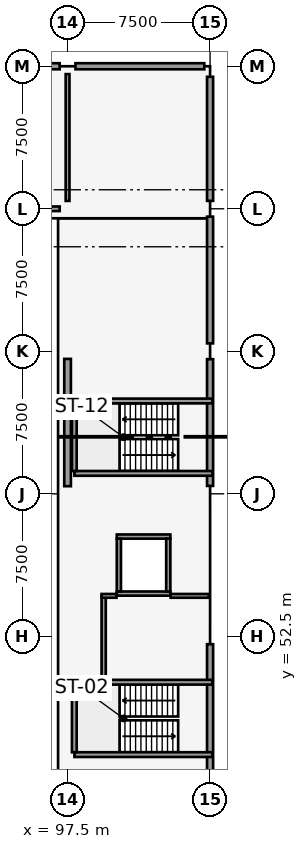
"""IFC4 building model, lengths in metres.
Left out: names, types, materials, properties, quantities, classifications, styles, units other than length and angle.
Written with IfcOpenShell. Run it as: python <this file> out.ifc"""

import sys

from ifc_helpers import new_model, si_unit, direction, frame, frame_2d, origin, origin_2d, place, context, subcontext, project, spatial, rectangle, extrude, element, fill, save


model = new_model("IFC4")
c1 = context("Model", 3, precision=1e-05, world=origin(), true_north=direction((0.0, 1.0)))
c2 = subcontext(c1, "Body", "Model", "MODEL_VIEW")
j1 = project(units=[si_unit("LENGTHUNIT", "METRE"), si_unit("PLANEANGLEUNIT", "RADIAN")], contexts=[c1])
p1 = place(None, origin())
s1 = spatial("IfcSite", under=j1, at=p1, CompositionType="ELEMENT")
p2 = place(p1, origin())
s2 = spatial("IfcBuilding", under=s1, at=p2, CompositionType="ELEMENT")
p3 = place(p2, frame((0.0, 0.0, 9.0)))
s3 = spatial("IfcBuildingStorey", under=s2, at=p3, CompositionType="ELEMENT", Elevation=9.0)
for number, where, z_axis, x_axis in (
    (1, (97.5, 52.5, 0.0), (0.0, 0.0, 1.0), (1.0, 0.0, 0.0)),
    (2, (97.5, 60.0, 0.0), (0.0, 0.0, 1.0), (1.0, 0.0, 0.0)),
    (3, (97.5, 67.5, 0.0), (0.0, 0.0, 1.0), (1.0, 0.0, 0.0)),
    (4, (97.5, 75.0, 0.0), (0.0, 0.0, 1.0), (1.0, 0.0, 0.0)),
    (5, (97.5, 82.5, 0.0), (0.0, 0.0, 1.0), (1.0, 0.0, 0.0)),
    (6, (105.0, 52.5, 0.0), (0.0, 0.0, 1.0), (1.0, 0.0, 0.0)),
    (7, (105.0, 60.0, 0.0), (0.0, 0.0, 1.0), (1.0, 0.0, 0.0)),
    (8, (105.0, 67.5, 0.0), (0.0, 0.0, 1.0), (1.0, 0.0, 0.0)),
    (9, (105.0, 75.0, 0.0), (0.0, 0.0, 1.0), (1.0, 0.0, 0.0)),
):
    element("IfcColumn", number, at=place(p3, frame(where, z_axis=z_axis, x_axis=x_axis)), inside=s3, PredefinedType="COLUMN", context=c2, shape_type="SweptSolid", body=[
        extrude(rectangle(XDim=0.8, YDim=0.8, at=origin_2d()), origin(), (0.0, 0.0, 1.0), 4.2),
    ])
p4 = place(p3, frame((105.0, 82.5, 0.0), z_axis=(0.0, 0.0, 1.0), x_axis=(1.0, 0.0, 0.0)))
e10 = element("IfcColumn", 10, at=p4, inside=s3, PredefinedType="COLUMN", context=c2, shape_type="SweptSolid", body=[
    extrude(rectangle(XDim=0.6, YDim=1.1, at=origin_2d()), origin(), (0.0, 0.0, 1.0), 4.2),
])
p5 = place(p3, frame((97.5, 60.4, 0.0), z_axis=(0.0, 0.0, 1.0), x_axis=(0.0, 1.0, 0.0)))
e11 = element("IfcWall", 11, at=p5, inside=s3, PredefinedType="SHEAR", context=c2, shape_type="SweptSolid", body=[
    extrude(rectangle(XDim=6.7, YDim=0.35, at=frame_2d((3.35, 0.0))), origin(), (0.0, 0.0, 1.0), 3.0),
])
p6 = place(p3, frame((105.0, 45.415, 0.0), z_axis=(0.0, 0.0, 1.0), x_axis=(0.0, 1.0, 0.0)))
e12 = element("IfcWall", 12, at=p6, inside=s3, PredefinedType="SOLIDWALL", context=c2, shape_type="SweptSolid", body=[
    extrude(rectangle(XDim=6.67, YDim=0.32, at=frame_2d((3.335, 0.0))), origin(), (0.0, 0.0, 1.0), 2.92),
])
p7 = place(p3, frame((105.0, 60.415, 0.0), z_axis=(0.0, 0.0, 1.0), x_axis=(0.0, 1.0, 0.0)))
e13 = element("IfcWall", 13, at=p7, inside=s3, PredefinedType="SOLIDWALL", context=c2, shape_type="SweptSolid", body=[
    extrude(rectangle(XDim=6.67, YDim=0.32, at=frame_2d((3.335, 0.0))), origin(), (0.0, 0.0, 1.0), 2.97),
])
p8 = place(p3, frame((105.0, 67.915, 0.0), z_axis=(0.0, 0.0, 1.0), x_axis=(0.0, 1.0, 0.0)))
e14 = element("IfcWall", 14, at=p8, inside=s3, PredefinedType="SOLIDWALL", context=c2, shape_type="SweptSolid", body=[
    extrude(rectangle(XDim=6.67, YDim=0.32, at=frame_2d((3.335, 0.0))), origin(), (0.0, 0.0, 1.0), 2.82),
])
p9 = place(p3, frame((105.0, 75.415, 0.0), z_axis=(0.0, 0.0, 1.0), x_axis=(0.0, 1.0, 0.0)))
e15 = element("IfcWall", 15, at=p9, inside=s3, PredefinedType="SOLIDWALL", context=c2, shape_type="SweptSolid", body=[
    extrude(rectangle(XDim=6.53, YDim=0.32, at=frame_2d((3.265, 0.0))), origin(), (0.0, 0.0, 1.0), 2.82),
])
p10 = place(p9, frame((4.225, 0.0, 0.6)))
e16 = element("IfcOpeningElement", 16, at=p10, cuts=e15, PredefinedType="OPENING", context=c2, shape_type="SweptSolid", body=[
    extrude(rectangle(XDim=1.35, YDim=1.15, at=frame_2d((0.675, 0.575))), frame((0.0, 0.17, 0.0), z_axis=(0.0, -1.0, 0.0), x_axis=(1.0, 0.0, 0.0)), (0.0, 0.0, 1.0), 0.34),
])
p11 = place(p3, frame((90.415, 82.5, 0.0), z_axis=(0.0, 0.0, 1.0), x_axis=(1.0, 0.0, 0.0)))
e17 = element("IfcWall", 17, at=p11, inside=s3, PredefinedType="SOLIDWALL", context=c2, shape_type="SweptSolid", body=[
    extrude(rectangle(XDim=6.67, YDim=0.32, at=frame_2d((3.335, 0.0))), origin(), (0.0, 0.0, 1.0), 3.12),
])
p12 = place(p11, frame((2.36, 0.0, 0.6)))
e18 = element("IfcOpeningElement", 18, at=p12, cuts=e17, PredefinedType="OPENING", context=c2, shape_type="SweptSolid", body=[
    extrude(rectangle(XDim=1.95, YDim=1.3, at=frame_2d((0.975, 0.65))), frame((0.0, 0.17, 0.0), z_axis=(0.0, -1.0, 0.0), x_axis=(1.0, 0.0, 0.0)), (0.0, 0.0, 1.0), 0.34),
])
p13 = place(p3, frame((97.915, 82.5, 0.0), z_axis=(0.0, 0.0, 1.0), x_axis=(1.0, 0.0, 0.0)))
e19 = element("IfcWall", 19, at=p13, inside=s3, PredefinedType="SOLIDWALL", context=c2, shape_type="SweptSolid", body=[
    extrude(rectangle(XDim=6.78, YDim=0.32, at=frame_2d((3.39, 0.0))), origin(), (0.0, 0.0, 1.0), 3.12),
])
p14 = place(p13, frame((2.285, 0.0, 0.6)))
e20 = element("IfcOpeningElement", 20, at=p14, cuts=e19, PredefinedType="OPENING", context=c2, shape_type="SweptSolid", body=[
    extrude(rectangle(XDim=2.1, YDim=1.3, at=frame_2d((1.05, 0.65))), frame((0.0, 0.17, 0.0), z_axis=(0.0, -1.0, 0.0), x_axis=(1.0, 0.0, 0.0)), (0.0, 0.0, 1.0), 0.34),
])
p15 = place(p3, frame((97.86, 46.275, 0.0), z_axis=(0.0, 0.0, 1.0), x_axis=(1.0, 0.0, 0.0)))
e21 = element("IfcWall", 21, at=p15, inside=s3, PredefinedType="SOLIDWALL", context=c2, shape_type="SweptSolid", body=[
    extrude(rectangle(XDim=7.26, YDim=0.25, at=frame_2d((3.63, 0.0))), origin(), (0.0, 0.0, 1.0), 3.92),
])
p16 = place(p15, frame((5.54, 0.0, 0.0)))
e22 = element("IfcOpeningElement", 22, at=p16, cuts=e21, PredefinedType="OPENING", context=c2, shape_type="SweptSolid", body=[
    extrude(rectangle(XDim=1.1, YDim=2.15, at=frame_2d((0.55, 1.075))), frame((0.0, 0.135, 0.0), z_axis=(0.0, -1.0, 0.0), x_axis=(1.0, 0.0, 0.0)), (0.0, 0.0, 1.0), 0.27),
])
p17 = place(p3, frame((97.86, 50.085, 0.0), z_axis=(0.0, 0.0, 1.0), x_axis=(1.0, 0.0, 0.0)))
e23 = element("IfcWall", 23, at=p17, inside=s3, PredefinedType="SOLIDWALL", context=c2, shape_type="SweptSolid", body=[
    extrude(rectangle(XDim=7.26, YDim=0.25, at=frame_2d((3.63, 0.0))), origin(), (0.0, 0.0, 1.0), 3.92),
])
p18 = place(p17, frame((5.54, 0.0, 0.0)))
e24 = element("IfcOpeningElement", 24, at=p18, cuts=e23, PredefinedType="OPENING", context=c2, shape_type="SweptSolid", body=[
    extrude(rectangle(XDim=1.1, YDim=2.15, at=frame_2d((0.55, 1.075))), frame((0.0, 0.135, 0.0), z_axis=(0.0, -1.0, 0.0), x_axis=(1.0, 0.0, 0.0)), (0.0, 0.0, 1.0), 0.27),
])
p19 = place(p3, frame((97.855, 46.4, 0.0), z_axis=(0.0, 0.0, 1.0), x_axis=(0.0, 1.0, 0.0)))
e25 = element("IfcWall", 25, at=p19, inside=s3, PredefinedType="SOLIDWALL", context=c2, shape_type="SweptSolid", body=[
    extrude(rectangle(XDim=3.56, YDim=0.25, at=frame_2d((1.78, 0.0))), origin(), (0.0, 0.0, 1.0), 3.92),
])
p20 = place(p3, frame((97.86, 61.075, 0.0), z_axis=(0.0, 0.0, 1.0), x_axis=(1.0, 0.0, 0.0)))
e26 = element("IfcWall", 26, at=p20, inside=s3, PredefinedType="SOLIDWALL", context=c2, shape_type="SweptSolid", body=[
    extrude(rectangle(XDim=7.26, YDim=0.25, at=frame_2d((3.63, 0.0))), origin(), (0.0, 0.0, 1.0), 3.92),
])
p21 = place(p20, frame((5.54, 0.0, 0.0)))
e27 = element("IfcOpeningElement", 27, at=p21, cuts=e26, PredefinedType="OPENING", context=c2, shape_type="SweptSolid", body=[
    extrude(rectangle(XDim=1.1, YDim=2.15, at=frame_2d((0.55, 1.075))), frame((0.0, 0.135, 0.0), z_axis=(0.0, -1.0, 0.0), x_axis=(1.0, 0.0, 0.0)), (0.0, 0.0, 1.0), 0.27),
])
p22 = place(p3, frame((97.86, 64.885, 0.0), z_axis=(0.0, 0.0, 1.0), x_axis=(1.0, 0.0, 0.0)))
e28 = element("IfcWall", 28, at=p22, inside=s3, PredefinedType="SOLIDWALL", context=c2, shape_type="SweptSolid", body=[
    extrude(rectangle(XDim=7.26, YDim=0.25, at=frame_2d((3.63, 0.0))), origin(), (0.0, 0.0, 1.0), 3.92),
])
p23 = place(p22, frame((5.54, 0.0, 0.0)))
e29 = element("IfcOpeningElement", 29, at=p23, cuts=e28, PredefinedType="OPENING", context=c2, shape_type="SweptSolid", body=[
    extrude(rectangle(XDim=1.1, YDim=2.15, at=frame_2d((0.55, 1.075))), frame((0.0, 0.135, 0.0), z_axis=(0.0, -1.0, 0.0), x_axis=(1.0, 0.0, 0.0)), (0.0, 0.0, 1.0), 0.27),
])
p24 = place(p3, frame((97.855, 61.2, 0.0), z_axis=(0.0, 0.0, 1.0), x_axis=(0.0, 1.0, 0.0)))
e30 = element("IfcWall", 30, at=p24, inside=s3, PredefinedType="SOLIDWALL", context=c2, shape_type="SweptSolid", body=[
    extrude(rectangle(XDim=3.56, YDim=0.25, at=frame_2d((1.78, 0.0))), origin(), (0.0, 0.0, 1.0), 3.92),
])
p25 = place(p3, frame((100.09, 54.75, 0.0), z_axis=(0.0, 0.0, 1.0), x_axis=(1.0, 0.0, 0.0)))
e31 = element("IfcWall", 31, at=p25, inside=s3, PredefinedType="SOLIDWALL", context=c2, shape_type="SweptSolid", body=[
    extrude(rectangle(XDim=2.82, YDim=0.22, at=frame_2d((1.41, 0.0))), origin(), (0.0, 0.0, 1.0), 3.92),
])
p26 = place(p25, frame((0.86, 0.0, 0.0)))
e32 = element("IfcOpeningElement", 32, at=p26, cuts=e31, PredefinedType="OPENING", context=c2, shape_type="SweptSolid", body=[
    extrude(rectangle(XDim=1.1, YDim=2.15, at=frame_2d((0.55, 1.075))), frame((0.0, 0.12, 0.0), z_axis=(0.0, -1.0, 0.0), x_axis=(1.0, 0.0, 0.0)), (0.0, 0.0, 1.0), 0.24),
])
p27 = place(p3, frame((100.09, 57.75, 0.0), z_axis=(0.0, 0.0, 1.0), x_axis=(1.0, 0.0, 0.0)))
e33 = element("IfcWall", 33, at=p27, inside=s3, PredefinedType="SOLIDWALL", context=c2, shape_type="SweptSolid", body=[
    extrude(rectangle(XDim=2.82, YDim=0.22, at=frame_2d((1.41, 0.0))), origin(), (0.0, 0.0, 1.0), 3.92),
])
for number, where, z_axis, x_axis in (
    (34, (100.2, 54.86, 0.0), (0.0, 0.0, 1.0), (0.0, 1.0, 0.0)),
    (35, (102.8, 54.86, 0.0), (0.0, 0.0, 1.0), (0.0, 1.0, 0.0)),
):
    element("IfcWall", number, at=place(p3, frame(where, z_axis=z_axis, x_axis=x_axis)), inside=s3, PredefinedType="SOLIDWALL", context=c2, shape_type="SweptSolid", body=[
        extrude(rectangle(XDim=2.78, YDim=0.22, at=frame_2d((1.39, 0.0))), origin(), (0.0, 0.0, 1.0), 3.92),
    ])
p28 = place(p3, frame((99.4, 50.22, 0.0), z_axis=(0.0, 0.0, 1.0), x_axis=(0.0, 1.0, 0.0)))
e36 = element("IfcWall", 36, at=p28, inside=s3, PredefinedType="SOLIDWALL", context=c2, shape_type="SweptSolid", body=[
    extrude(rectangle(XDim=4.41, YDim=0.22, at=frame_2d((2.205, 0.0))), origin(), (0.0, 0.0, 1.0), 3.92),
])
p29 = place(p28, frame((0.45, 0.0, 0.0)))
e37 = element("IfcOpeningElement", 37, at=p29, cuts=e36, PredefinedType="OPENING", context=c2, shape_type="SweptSolid", body=[
    extrude(rectangle(XDim=1.1, YDim=2.15, at=frame_2d((0.55, 1.075))), frame((0.0, 0.12, 0.0), z_axis=(0.0, -1.0, 0.0), x_axis=(1.0, 0.0, 0.0)), (0.0, 0.0, 1.0), 0.24),
])
p30 = place(p3, frame((99.29, 54.63, 0.0), z_axis=(0.0, 0.0, 1.0), x_axis=(1.0, 0.0, 0.0)))
e38 = element("IfcWall", 38, at=p30, inside=s3, PredefinedType="PARTITIONING", context=c2, shape_type="SweptSolid", body=[
    extrude(rectangle(XDim=0.785, YDim=0.2, at=frame_2d((0.393, 0.0))), origin(), (0.0, 0.0, 1.0), 3.9),
])
p31 = place(p3, frame((102.925, 54.63, 0.0), z_axis=(0.0, 0.0, 1.0), x_axis=(1.0, 0.0, 0.0)))
e39 = element("IfcWall", 39, at=p31, inside=s3, PredefinedType="PARTITIONING", context=c2, shape_type="SweptSolid", body=[
    extrude(rectangle(XDim=2.015, YDim=0.2, at=frame_2d((1.007, 0.0))), origin(), (0.0, 0.0, 1.0), 3.13),
])
p32 = place(p3, frame((90.414, 75.0, 0.0), z_axis=(0.0, 0.0, 1.0), x_axis=(1.0, 0.0, 0.0)))
e40 = element("IfcWall", 40, at=p32, inside=s3, PredefinedType="PARTITIONING", context=c2, shape_type="SweptSolid", body=[
    extrude(rectangle(XDim=6.672, YDim=0.24, at=frame_2d((3.336, 0.0))), origin(), (0.0, 0.0, 1.0), 2.82),
])
p33 = place(p3, frame((97.5, 75.414, 0.0), z_axis=(0.0, 0.0, 1.0), x_axis=(0.0, 1.0, 0.0)))
e41 = element("IfcWall", 41, at=p33, inside=s3, PredefinedType="PARTITIONING", context=c2, shape_type="SweptSolid", body=[
    extrude(rectangle(XDim=6.672, YDim=0.2, at=frame_2d((3.336, 0.0))), origin(), (0.0, 0.0, 1.0), 2.82),
])
p34 = place(p33, frame((2.536, 0.0, 0.0)))
e42 = element("IfcOpeningElement", 42, at=p34, cuts=e41, PredefinedType="OPENING", context=c2, shape_type="SweptSolid", body=[
    extrude(rectangle(XDim=1.6, YDim=2.15, at=frame_2d((0.8, 1.075))), frame((0.0, 0.11, 0.0), z_axis=(0.0, -1.0, 0.0), x_axis=(1.0, 0.0, 0.0)), (0.0, 0.0, 1.0), 0.22),
])
p35 = place(p10, origin())
e43 = element("IfcWindow", 43, at=p35, inside=s3, PartitioningType="SINGLE_PANEL", PredefinedType="WINDOW", context=c2, shape_type="SweptSolid", body=[
    extrude(rectangle(XDim=1.35, YDim=1.15, at=frame_2d((0.675, 0.575))), frame((0.0, 0.03, 0.0), z_axis=(0.0, -1.0, 0.0), x_axis=(1.0, 0.0, 0.0)), (0.0, 0.0, 1.0), 0.06),
])
fill(e16, e43)
p36 = place(p14, origin())
e44 = element("IfcWindow", 44, at=p36, inside=s3, PartitioningType="SINGLE_PANEL", PredefinedType="WINDOW", context=c2, shape_type="SweptSolid", body=[
    extrude(rectangle(XDim=2.1, YDim=1.3, at=frame_2d((1.05, 0.65))), frame((0.0, 0.03, 0.0), z_axis=(0.0, -1.0, 0.0), x_axis=(1.0, 0.0, 0.0)), (0.0, 0.0, 1.0), 0.06),
])
fill(e20, e44)
p37 = place(p16, origin())
e45 = element("IfcDoor", 45, at=p37, inside=s3, OperationType="SINGLE_SWING_LEFT", PredefinedType="DOOR", context=c2, shape_type="SweptSolid", body=[
    extrude(rectangle(XDim=1.1, YDim=2.15, at=frame_2d((0.55, 1.075))), frame((0.0, 0.025, 0.0), z_axis=(0.0, -1.0, 0.0), x_axis=(1.0, 0.0, 0.0)), (0.0, 0.0, 1.0), 0.05),
])
fill(e22, e45)
p38 = place(p18, frame((1.1, 0.0, 0.0), z_axis=(0.0, 0.0, 1.0), x_axis=(-1.0, 0.0, 0.0)))
e46 = element("IfcDoor", 46, at=p38, inside=s3, OperationType="SINGLE_SWING_RIGHT", PredefinedType="DOOR", context=c2, shape_type="SweptSolid", body=[
    extrude(rectangle(XDim=1.1, YDim=2.15, at=frame_2d((0.55, 1.075))), frame((0.0, 0.025, 0.0), z_axis=(0.0, -1.0, 0.0), x_axis=(1.0, 0.0, 0.0)), (0.0, 0.0, 1.0), 0.05),
])
fill(e24, e46)
p39 = place(p21, origin())
e47 = element("IfcDoor", 47, at=p39, inside=s3, OperationType="SINGLE_SWING_LEFT", PredefinedType="DOOR", context=c2, shape_type="SweptSolid", body=[
    extrude(rectangle(XDim=1.1, YDim=2.15, at=frame_2d((0.55, 1.075))), frame((0.0, 0.025, 0.0), z_axis=(0.0, -1.0, 0.0), x_axis=(1.0, 0.0, 0.0)), (0.0, 0.0, 1.0), 0.05),
])
fill(e27, e47)
p40 = place(p23, frame((1.1, 0.0, 0.0), z_axis=(0.0, 0.0, 1.0), x_axis=(-1.0, 0.0, 0.0)))
e48 = element("IfcDoor", 48, at=p40, inside=s3, OperationType="SINGLE_SWING_RIGHT", PredefinedType="DOOR", context=c2, shape_type="SweptSolid", body=[
    extrude(rectangle(XDim=1.1, YDim=2.15, at=frame_2d((0.55, 1.075))), frame((0.0, 0.025, 0.0), z_axis=(0.0, -1.0, 0.0), x_axis=(1.0, 0.0, 0.0)), (0.0, 0.0, 1.0), 0.05),
])
fill(e29, e48)
p41 = place(p26, origin())
e49 = element("IfcDoor", 49, at=p41, inside=s3, OperationType="SLIDING_TO_LEFT", PredefinedType="DOOR", context=c2, shape_type="SweptSolid", body=[
    extrude(rectangle(XDim=1.1, YDim=2.15, at=frame_2d((0.55, 1.075))), frame((0.0, 0.025, 0.0), z_axis=(0.0, -1.0, 0.0), x_axis=(1.0, 0.0, 0.0)), (0.0, 0.0, 1.0), 0.05),
])
fill(e32, e49)
p42 = place(p29, origin())
e50 = element("IfcDoor", 50, at=p42, inside=s3, OperationType="SINGLE_SWING_LEFT", PredefinedType="DOOR", context=c2, shape_type="SweptSolid", body=[
    extrude(rectangle(XDim=1.1, YDim=2.15, at=frame_2d((0.55, 1.075))), frame((0.0, 0.025, 0.0), z_axis=(0.0, -1.0, 0.0), x_axis=(1.0, 0.0, 0.0)), (0.0, 0.0, 1.0), 0.05),
])
fill(e37, e50)
p43 = place(p34, origin())
e51 = element("IfcDoor", 51, at=p43, inside=s3, OperationType="SINGLE_SWING_LEFT", PredefinedType="DOOR", context=c2, shape_type="SweptSolid", body=[
    extrude(rectangle(XDim=1.6, YDim=2.15, at=frame_2d((0.8, 1.075))), frame((0.0, 0.025, 0.0), z_axis=(0.0, -1.0, 0.0), x_axis=(1.0, 0.0, 0.0)), (0.0, 0.0, 1.0), 0.05),
])
fill(e42, e51)
save(model, sys.argv[1])
